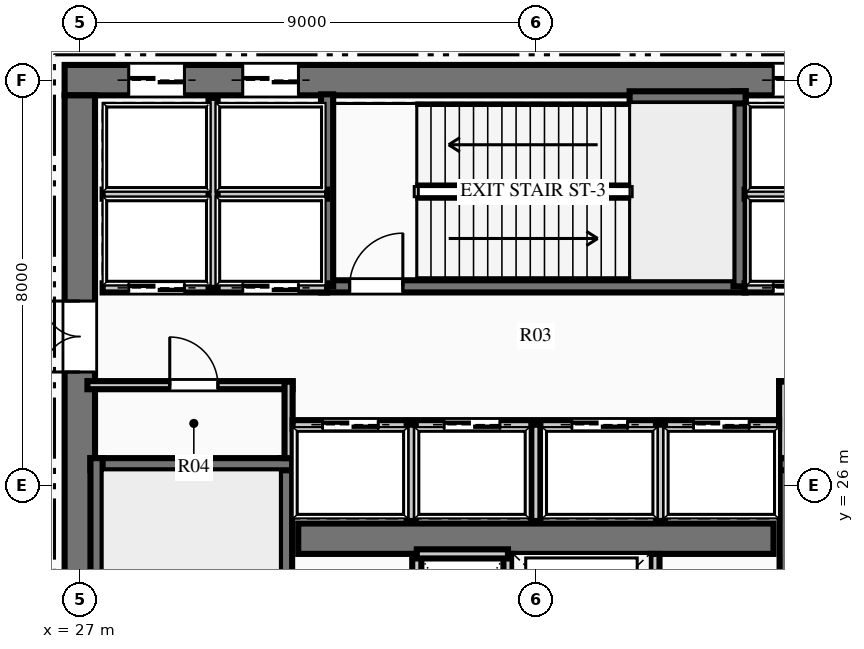
"""IFC4 building model, lengths in metres.
Left out: names, types, materials, properties, quantities, classifications, styles, units other than length and angle.
Written with IfcOpenShell. Run it as: python <this file> out.ifc"""

import sys

from ifc_helpers import new_model, si_unit, direction, frame, frame_2d, origin, place, context, subcontext, project, spatial, rectangle, extrude, element, fill, save


model = new_model("IFC4")
c1 = context("Model", 3, precision=1e-05, world=origin(), true_north=direction((0.0, 1.0)))
c2 = subcontext(c1, "Body", "Model", "MODEL_VIEW")
j1 = project(units=[si_unit("LENGTHUNIT", "METRE"), si_unit("PLANEANGLEUNIT", "RADIAN")], contexts=[c1])
p1 = place(None, origin())
s1 = spatial("IfcSite", under=j1, at=p1, CompositionType="ELEMENT")
p2 = place(p1, origin())
s2 = spatial("IfcBuilding", under=s1, at=p2, CompositionType="ELEMENT")
p3 = place(p2, frame((0.0, 0.0, 16.8)))
s3 = spatial("IfcBuildingStorey", under=s2, at=p3, CompositionType="ELEMENT", Elevation=16.8)
p4 = place(p3, frame((26.7, 34.0, 0.0), z_axis=(0.0, 0.0, 1.0), x_axis=(1.0, 0.0, 0.0)))
e1 = element("IfcWall", 1, at=p4, inside=s3, PredefinedType="SHEAR", context=c2, shape_type="SweptSolid", body=[
    extrude(rectangle(XDim=18.6, YDim=0.6, at=frame_2d((9.3, 0.0))), origin(), (0.0, 0.0, 1.0), 5.4),
])
p5 = place(p4, frame((1.265, 0.0, 0.0)))
e2 = element("IfcOpeningElement", 2, at=p5, cuts=e1, PredefinedType="OPENING", context=c2, shape_type="SweptSolid", body=[
    extrude(rectangle(XDim=1.1, YDim=2.15, at=frame_2d((0.55, 1.075))), frame((0.0, 0.31, 0.0), z_axis=(0.0, -1.0, 0.0), x_axis=(1.0, 0.0, 0.0)), (0.0, 0.0, 1.0), 0.62),
])
p6 = place(p4, frame((3.515, 0.0, 0.0)))
e3 = element("IfcOpeningElement", 3, at=p6, cuts=e1, PredefinedType="OPENING", context=c2, shape_type="SweptSolid", body=[
    extrude(rectangle(XDim=1.1, YDim=2.15, at=frame_2d((0.55, 1.075))), frame((0.0, 0.31, 0.0), z_axis=(0.0, -1.0, 0.0), x_axis=(1.0, 0.0, 0.0)), (0.0, 0.0, 1.0), 0.62),
])
p7 = place(p4, frame((13.985, 0.0, 0.0)))
e4 = element("IfcOpeningElement", 4, at=p7, cuts=e1, PredefinedType="OPENING", context=c2, shape_type="SweptSolid", body=[
    extrude(rectangle(XDim=1.1, YDim=2.15, at=frame_2d((0.55, 1.075))), frame((0.0, 0.31, 0.0), z_axis=(0.0, -1.0, 0.0), x_axis=(1.0, 0.0, 0.0)), (0.0, 0.0, 1.0), 0.62),
])
p8 = place(p4, frame((16.235, 0.0, 0.0)))
e5 = element("IfcOpeningElement", 5, at=p8, cuts=e1, PredefinedType="OPENING", context=c2, shape_type="SweptSolid", body=[
    extrude(rectangle(XDim=1.1, YDim=2.15, at=frame_2d((0.55, 1.075))), frame((0.0, 0.31, 0.0), z_axis=(0.0, -1.0, 0.0), x_axis=(1.0, 0.0, 0.0)), (0.0, 0.0, 1.0), 0.62),
])
p9 = place(p3, frame((27.0, 18.3, 0.0), z_axis=(0.0, 0.0, 1.0), x_axis=(0.0, 1.0, 0.0)))
e6 = element("IfcWall", 6, at=p9, inside=s3, PredefinedType="SHEAR", context=c2, shape_type="SweptSolid", body=[
    extrude(rectangle(XDim=15.4, YDim=0.6, at=frame_2d((7.7, 0.0))), origin(), (0.0, 0.0, 1.0), 5.4),
])
p10 = place(p9, frame((9.94, 0.0, 0.0)))
e7 = element("IfcOpeningElement", 7, at=p10, cuts=e6, PredefinedType="OPENING", context=c2, shape_type="SweptSolid", body=[
    extrude(rectangle(XDim=1.4, YDim=2.2, at=frame_2d((0.7, 1.1))), frame((0.0, 0.31, 0.0), z_axis=(0.0, -1.0, 0.0), x_axis=(1.0, 0.0, 0.0)), (0.0, 0.0, 1.0), 0.62),
])
p11 = place(p3, frame((31.31, 24.95, 0.0), z_axis=(0.0, 0.0, 1.0), x_axis=(1.0, 0.0, 0.0)))
e8 = element("IfcWall", 8, at=p11, inside=s3, PredefinedType="SHEAR", context=c2, shape_type="SweptSolid", body=[
    extrude(rectangle(XDim=9.38, YDim=0.6, at=frame_2d((4.69, 0.0))), origin(), (0.0, 0.0, 1.0), 5.4),
])
p12 = place(p3, frame((31.07, 18.28, 0.0), z_axis=(0.0, 0.0, 1.0), x_axis=(0.0, 1.0, 0.0)))
e9 = element("IfcWall", 9, at=p12, inside=s3, PredefinedType="SHEAR", context=c2, shape_type="SweptSolid", body=[
    extrude(rectangle(XDim=8.26, YDim=0.24, at=frame_2d((4.13, 0.0))), origin(), (0.0, 0.0, 1.0), 5.4),
])
p13 = place(p12, frame((0.365, 0.0, 0.0)))
e10 = element("IfcOpeningElement", 10, at=p13, cuts=e9, PredefinedType="OPENING", context=c2, shape_type="SweptSolid", body=[
    extrude(rectangle(XDim=1.05, YDim=2.15, at=frame_2d((0.525, 1.075))), frame((0.0, 0.13, 0.0), z_axis=(0.0, -1.0, 0.0), x_axis=(1.0, 0.0, 0.0)), (0.0, 0.0, 1.0), 0.26),
])
p14 = place(p3, frame((27.21, 26.42, 0.0), z_axis=(0.0, 0.0, 1.0), x_axis=(1.0, 0.0, 0.0)))
e11 = element("IfcWall", 11, at=p14, inside=s3, PredefinedType="SHEAR", context=c2, shape_type="SweptSolid", body=[
    extrude(rectangle(XDim=3.98, YDim=0.24, at=frame_2d((1.99, 0.0))), origin(), (0.0, 0.0, 1.0), 5.4),
])
p15 = place(p3, frame((27.33, 18.28, 0.0), z_axis=(0.0, 0.0, 1.0), x_axis=(0.0, 1.0, 0.0)))
e12 = element("IfcWall", 12, at=p15, inside=s3, PredefinedType="SHEAR", context=c2, shape_type="SweptSolid", body=[
    extrude(rectangle(XDim=8.26, YDim=0.24, at=frame_2d((4.13, 0.0))), origin(), (0.0, 0.0, 1.0), 5.4),
])
p16 = place(p3, frame((40.93, 18.28, 0.0), z_axis=(0.0, 0.0, 1.0), x_axis=(0.0, 1.0, 0.0)))
e13 = element("IfcWall", 13, at=p16, inside=s3, PredefinedType="SHEAR", context=c2, shape_type="SweptSolid", body=[
    extrude(rectangle(XDim=8.26, YDim=0.24, at=frame_2d((4.13, 0.0))), origin(), (0.0, 0.0, 1.0), 5.4),
])
p17 = place(p16, frame((0.365, 0.0, 0.0)))
e14 = element("IfcOpeningElement", 14, at=p17, cuts=e13, PredefinedType="OPENING", context=c2, shape_type="SweptSolid", body=[
    extrude(rectangle(XDim=1.05, YDim=2.15, at=frame_2d((0.525, 1.075))), frame((0.0, 0.13, 0.0), z_axis=(0.0, -1.0, 0.0), x_axis=(1.0, 0.0, 0.0)), (0.0, 0.0, 1.0), 0.26),
])
p18 = place(p3, frame((40.81, 26.42, 0.0), z_axis=(0.0, 0.0, 1.0), x_axis=(1.0, 0.0, 0.0)))
e15 = element("IfcWall", 15, at=p18, inside=s3, PredefinedType="SHEAR", context=c2, shape_type="SweptSolid", body=[
    extrude(rectangle(XDim=3.98, YDim=0.24, at=frame_2d((1.99, 0.0))), origin(), (0.0, 0.0, 1.0), 5.4),
])
p19 = place(p3, frame((31.76, 29.93, 0.0), z_axis=(0.0, 0.0, 1.0), x_axis=(1.0, 0.0, 0.0)))
e16 = element("IfcWall", 16, at=p19, inside=s3, PredefinedType="SHEAR", context=c2, shape_type="SweptSolid", body=[
    extrude(rectangle(XDim=8.38, YDim=0.24, at=frame_2d((4.19, 0.0))), origin(), (0.0, 0.0, 1.0), 5.4),
])
p20 = place(p19, frame((0.565, 0.0, 0.0)))
e17 = element("IfcOpeningElement", 17, at=p20, cuts=e16, PredefinedType="OPENING", context=c2, shape_type="SweptSolid", body=[
    extrude(rectangle(XDim=1.05, YDim=2.15, at=frame_2d((0.525, 1.075))), frame((0.0, 0.13, 0.0), z_axis=(0.0, -1.0, 0.0), x_axis=(1.0, 0.0, 0.0)), (0.0, 0.0, 1.0), 0.26),
])
p21 = place(p3, frame((31.88, 29.93, 0.0), z_axis=(0.0, 0.0, 1.0), x_axis=(0.0, 1.0, 0.0)))
e18 = element("IfcWall", 18, at=p21, inside=s3, PredefinedType="SHEAR", context=c2, shape_type="SweptSolid", body=[
    extrude(rectangle(XDim=3.79, YDim=0.24, at=frame_2d((1.895, 0.0))), origin(), (0.0, 0.0, 1.0), 5.4),
])
p22 = place(p3, frame((40.02, 29.93, 0.0), z_axis=(0.0, 0.0, 1.0), x_axis=(0.0, 1.0, 0.0)))
e19 = element("IfcWall", 19, at=p22, inside=s3, PredefinedType="SHEAR", context=c2, shape_type="SweptSolid", body=[
    extrude(rectangle(XDim=3.85, YDim=0.24, at=frame_2d((1.925, 0.0))), origin(), (0.0, 0.0, 1.0), 5.4),
])
p23 = place(p3, frame((37.85, 33.66, 0.0), z_axis=(0.0, 0.0, 1.0), x_axis=(1.0, 0.0, 0.0)))
e20 = element("IfcWall", 20, at=p23, inside=s3, PredefinedType="SHEAR", context=c2, shape_type="SweptSolid", body=[
    extrude(rectangle(XDim=2.29, YDim=0.24, at=frame_2d((1.145, 0.0))), origin(), (0.0, 0.0, 1.0), 5.4),
])
for number, where, z_axis, x_axis in (
    (21, (33.65, 22.05, 0.0), (0.0, 0.0, 1.0), (0.0, 1.0, 0.0)),
    (22, (35.45, 22.05, 0.0), (0.0, 0.0, 1.0), (0.0, 1.0, 0.0)),
):
    element("IfcWall", number, at=place(p3, frame(where, z_axis=z_axis, x_axis=x_axis)), inside=s3, PredefinedType="PARTITIONING", context=c2, shape_type="SweptSolid", body=[
        extrude(rectangle(XDim=2.6, YDim=0.18, at=frame_2d((1.3, 0.0))), origin(), (0.0, 0.0, 1.0), 4.98),
    ])
p24 = place(p3, frame((33.65, 24.65, 0.0), z_axis=(0.0, 0.0, 1.0), x_axis=(1.0, 0.0, 0.0)))
e23 = element("IfcWall", 23, at=p24, inside=s3, PredefinedType="PARTITIONING", context=c2, shape_type="SweptSolid", body=[
    extrude(rectangle(XDim=1.8, YDim=0.18, at=frame_2d((0.9, 0.0))), origin(), (0.0, 0.0, 1.0), 4.98),
])
p25 = place(p3, frame((38.35, 22.05, 0.0), z_axis=(0.0, 0.0, 1.0), x_axis=(0.0, 1.0, 0.0)))
e24 = element("IfcWall", 24, at=p25, inside=s3, PredefinedType="PARTITIONING", context=c2, shape_type="SweptSolid", body=[
    extrude(rectangle(XDim=2.6, YDim=0.18, at=frame_2d((1.3, 0.0))), origin(), (0.0, 0.0, 1.0), 4.98),
])
p26 = place(p3, frame((27.15, 27.98, 0.0), z_axis=(0.0, 0.0, 1.0), x_axis=(1.0, 0.0, 0.0)))
e25 = element("IfcWall", 25, at=p26, inside=s3, PredefinedType="PARTITIONING", context=c2, shape_type="SweptSolid", body=[
    extrude(rectangle(XDim=4.05, YDim=0.16, at=frame_2d((2.025, 0.0))), origin(), (0.0, 0.0, 1.0), 4.98),
])
p27 = place(p26, frame((1.625, 0.0, 0.0)))
e26 = element("IfcOpeningElement", 26, at=p27, cuts=e25, PredefinedType="OPENING", context=c2, shape_type="SweptSolid", body=[
    extrude(rectangle(XDim=0.95, YDim=2.15, at=frame_2d((0.475, 1.075))), frame((0.0, 0.09, 0.0), z_axis=(0.0, -1.0, 0.0), x_axis=(1.0, 0.0, 0.0)), (0.0, 0.0, 1.0), 0.18),
])
p28 = place(p3, frame((31.12, 26.54, 0.0), z_axis=(0.0, 0.0, 1.0), x_axis=(0.0, 1.0, 0.0)))
e27 = element("IfcWall", 27, at=p28, inside=s3, PredefinedType="PARTITIONING", context=c2, shape_type="SweptSolid", body=[
    extrude(rectangle(XDim=1.51, YDim=0.16, at=frame_2d((0.755, 0.0))), origin(), (0.0, 0.0, 1.0), 4.98),
])
p29 = place(p3, frame((40.8, 27.98, 0.0), z_axis=(0.0, 0.0, 1.0), x_axis=(1.0, 0.0, 0.0)))
e28 = element("IfcWall", 28, at=p29, inside=s3, PredefinedType="PARTITIONING", context=c2, shape_type="SweptSolid", body=[
    extrude(rectangle(XDim=4.05, YDim=0.16, at=frame_2d((2.025, 0.0))), origin(), (0.0, 0.0, 1.0), 4.98),
])
p30 = place(p29, frame((0.407, 0.0, 0.0)))
e29 = element("IfcOpeningElement", 29, at=p30, cuts=e28, PredefinedType="OPENING", context=c2, shape_type="SweptSolid", body=[
    extrude(rectangle(XDim=0.9, YDim=2.15, at=frame_2d((0.45, 1.075))), frame((0.0, 0.09, 0.0), z_axis=(0.0, -1.0, 0.0), x_axis=(1.0, 0.0, 0.0)), (0.0, 0.0, 1.0), 0.18),
])
p31 = place(p29, frame((2.2, 0.0, 0.0)))
e30 = element("IfcOpeningElement", 30, at=p31, cuts=e28, PredefinedType="OPENING", context=c2, shape_type="SweptSolid", body=[
    extrude(rectangle(XDim=0.9, YDim=2.15, at=frame_2d((0.45, 1.075))), frame((0.0, 0.09, 0.0), z_axis=(0.0, -1.0, 0.0), x_axis=(1.0, 0.0, 0.0)), (0.0, 0.0, 1.0), 0.18),
])
p32 = place(p3, frame((40.88, 26.54, 0.0), z_axis=(0.0, 0.0, 1.0), x_axis=(0.0, 1.0, 0.0)))
e31 = element("IfcWall", 31, at=p32, inside=s3, PredefinedType="PARTITIONING", context=c2, shape_type="SweptSolid", body=[
    extrude(rectangle(XDim=1.51, YDim=0.16, at=frame_2d((0.755, 0.0))), origin(), (0.0, 0.0, 1.0), 4.98),
])
p33 = place(p3, frame((27.45, 29.9, 0.0), z_axis=(0.0, 0.0, 1.0), x_axis=(1.0, 0.0, 0.0)))
e32 = element("IfcWall", 32, at=p33, inside=s3, PredefinedType="PARTITIONING", context=c2, shape_type="SweptSolid", body=[
    extrude(rectangle(XDim=4.43, YDim=0.18, at=frame_2d((2.215, 0.0))), origin(), (0.0, 0.0, 1.0), 4.98),
])
p34 = place(p33, frame((0.515, 0.0, 0.0)))
e33 = element("IfcOpeningElement", 33, at=p34, cuts=e32, PredefinedType="OPENING", context=c2, shape_type="SweptSolid", body=[
    extrude(rectangle(XDim=1.1, YDim=2.15, at=frame_2d((0.55, 1.075))), frame((0.0, 0.1, 0.0), z_axis=(0.0, -1.0, 0.0), x_axis=(1.0, 0.0, 0.0)), (0.0, 0.0, 1.0), 0.2),
])
p35 = place(p33, frame((2.765, 0.0, 0.0)))
e34 = element("IfcOpeningElement", 34, at=p35, cuts=e32, PredefinedType="OPENING", context=c2, shape_type="SweptSolid", body=[
    extrude(rectangle(XDim=1.1, YDim=2.15, at=frame_2d((0.55, 1.075))), frame((0.0, 0.1, 0.0), z_axis=(0.0, -1.0, 0.0), x_axis=(1.0, 0.0, 0.0)), (0.0, 0.0, 1.0), 0.2),
])
p36 = place(p3, frame((27.45, 31.75, 0.0), z_axis=(0.0, 0.0, 1.0), x_axis=(1.0, 0.0, 0.0)))
e35 = element("IfcWall", 35, at=p36, inside=s3, PredefinedType="PARTITIONING", context=c2, shape_type="SweptSolid", body=[
    extrude(rectangle(XDim=4.43, YDim=0.18, at=frame_2d((2.215, 0.0))), origin(), (0.0, 0.0, 1.0), 4.98),
])
p37 = place(p3, frame((29.63, 29.9, 0.0), z_axis=(0.0, 0.0, 1.0), x_axis=(0.0, 1.0, 0.0)))
e36 = element("IfcWall", 36, at=p37, inside=s3, PredefinedType="PARTITIONING", context=c2, shape_type="SweptSolid", body=[
    extrude(rectangle(XDim=3.75, YDim=0.18, at=frame_2d((1.875, 0.0))), origin(), (0.0, 0.0, 1.0), 4.98),
])
p38 = place(p3, frame((40.12, 29.9, 0.0), z_axis=(0.0, 0.0, 1.0), x_axis=(1.0, 0.0, 0.0)))
e37 = element("IfcWall", 37, at=p38, inside=s3, PredefinedType="PARTITIONING", context=c2, shape_type="SweptSolid", body=[
    extrude(rectangle(XDim=4.43, YDim=0.18, at=frame_2d((2.215, 0.0))), origin(), (0.0, 0.0, 1.0), 4.98),
])
p39 = place(p38, frame((0.565, 0.0, 0.0)))
e38 = element("IfcOpeningElement", 38, at=p39, cuts=e37, PredefinedType="OPENING", context=c2, shape_type="SweptSolid", body=[
    extrude(rectangle(XDim=1.1, YDim=2.15, at=frame_2d((0.55, 1.075))), frame((0.0, 0.1, 0.0), z_axis=(0.0, -1.0, 0.0), x_axis=(1.0, 0.0, 0.0)), (0.0, 0.0, 1.0), 0.2),
])
p40 = place(p38, frame((2.815, 0.0, 0.0)))
e39 = element("IfcOpeningElement", 39, at=p40, cuts=e37, PredefinedType="OPENING", context=c2, shape_type="SweptSolid", body=[
    extrude(rectangle(XDim=1.1, YDim=2.15, at=frame_2d((0.55, 1.075))), frame((0.0, 0.1, 0.0), z_axis=(0.0, -1.0, 0.0), x_axis=(1.0, 0.0, 0.0)), (0.0, 0.0, 1.0), 0.2),
])
p41 = place(p3, frame((40.12, 31.75, 0.0), z_axis=(0.0, 0.0, 1.0), x_axis=(1.0, 0.0, 0.0)))
e40 = element("IfcWall", 40, at=p41, inside=s3, PredefinedType="PARTITIONING", context=c2, shape_type="SweptSolid", body=[
    extrude(rectangle(XDim=4.43, YDim=0.18, at=frame_2d((2.215, 0.0))), origin(), (0.0, 0.0, 1.0), 4.98),
])
p42 = place(p3, frame((31.2, 27.2, 0.0), z_axis=(0.0, 0.0, 1.0), x_axis=(1.0, 0.0, 0.0)))
e41 = element("IfcWall", 41, at=p42, inside=s3, PredefinedType="PARTITIONING", context=c2, shape_type="SweptSolid", body=[
    extrude(rectangle(XDim=9.6, YDim=0.18, at=frame_2d((4.8, 0.0))), origin(), (0.0, 0.0, 1.0), 4.98),
])
p43 = place(p42, frame((0.59, 0.0, 0.0)))
e42 = element("IfcOpeningElement", 42, at=p43, cuts=e41, PredefinedType="OPENING", context=c2, shape_type="SweptSolid", body=[
    extrude(rectangle(XDim=1.1, YDim=2.15, at=frame_2d((0.55, 1.075))), frame((0.0, 0.1, 0.0), z_axis=(0.0, -1.0, 0.0), x_axis=(1.0, 0.0, 0.0)), (0.0, 0.0, 1.0), 0.2),
])
p44 = place(p42, frame((2.99, 0.0, 0.0)))
e43 = element("IfcOpeningElement", 43, at=p44, cuts=e41, PredefinedType="OPENING", context=c2, shape_type="SweptSolid", body=[
    extrude(rectangle(XDim=1.1, YDim=2.15, at=frame_2d((0.55, 1.075))), frame((0.0, 0.1, 0.0), z_axis=(0.0, -1.0, 0.0), x_axis=(1.0, 0.0, 0.0)), (0.0, 0.0, 1.0), 0.2),
])
p45 = place(p42, frame((5.51, 0.0, 0.0)))
e44 = element("IfcOpeningElement", 44, at=p45, cuts=e41, PredefinedType="OPENING", context=c2, shape_type="SweptSolid", body=[
    extrude(rectangle(XDim=1.1, YDim=2.15, at=frame_2d((0.55, 1.075))), frame((0.0, 0.1, 0.0), z_axis=(0.0, -1.0, 0.0), x_axis=(1.0, 0.0, 0.0)), (0.0, 0.0, 1.0), 0.2),
])
p46 = place(p42, frame((7.91, 0.0, 0.0)))
e45 = element("IfcOpeningElement", 45, at=p46, cuts=e41, PredefinedType="OPENING", context=c2, shape_type="SweptSolid", body=[
    extrude(rectangle(XDim=1.1, YDim=2.15, at=frame_2d((0.55, 1.075))), frame((0.0, 0.1, 0.0), z_axis=(0.0, -1.0, 0.0), x_axis=(1.0, 0.0, 0.0)), (0.0, 0.0, 1.0), 0.2),
])
for number, where, z_axis, x_axis in (
    (46, (33.54, 25.3, 0.0), (0.0, 0.0, 1.0), (0.0, 1.0, 0.0)),
    (47, (36.0, 25.3, 0.0), (0.0, 0.0, 1.0), (0.0, 1.0, 0.0)),
    (48, (38.46, 25.3, 0.0), (0.0, 0.0, 1.0), (0.0, 1.0, 0.0)),
):
    element("IfcWall", number, at=place(p3, frame(where, z_axis=z_axis, x_axis=x_axis)), inside=s3, PredefinedType="PARTITIONING", context=c2, shape_type="SweptSolid", body=[
        extrude(rectangle(XDim=1.9, YDim=0.18, at=frame_2d((0.95, 0.0))), origin(), (0.0, 0.0, 1.0), 4.98),
    ])
p47 = place(p27, origin())
e49 = element("IfcDoor", 49, at=p47, inside=s3, OperationType="SINGLE_SWING_LEFT", PredefinedType="DOOR", context=c2, shape_type="SweptSolid", body=[
    extrude(rectangle(XDim=0.95, YDim=2.15, at=frame_2d((0.475, 1.075))), frame((0.0, 0.025, 0.0), z_axis=(0.0, -1.0, 0.0), x_axis=(1.0, 0.0, 0.0)), (0.0, 0.0, 1.0), 0.05),
])
fill(e26, e49)
p48 = place(p20, origin())
e50 = element("IfcDoor", 50, at=p48, inside=s3, OperationType="SINGLE_SWING_RIGHT", PredefinedType="DOOR", context=c2, shape_type="SweptSolid", body=[
    extrude(rectangle(XDim=1.05, YDim=2.15, at=frame_2d((0.525, 1.075))), frame((0.0, 0.025, 0.0), z_axis=(0.0, -1.0, 0.0), x_axis=(1.0, 0.0, 0.0)), (0.0, 0.0, 1.0), 0.05),
])
fill(e17, e50)
p49 = place(p10, origin())
e51 = element("IfcDoor", 51, at=p49, inside=s3, OperationType="DOUBLE_DOOR_SINGLE_SWING", PredefinedType="DOOR", context=c2, shape_type="SweptSolid", body=[
    extrude(rectangle(XDim=1.4, YDim=2.2, at=frame_2d((0.7, 1.1))), frame((0.0, 0.025, 0.0), z_axis=(0.0, -1.0, 0.0), x_axis=(1.0, 0.0, 0.0)), (0.0, 0.0, 1.0), 0.05),
])
fill(e7, e51)
p50 = place(p34, origin())
e52 = element("IfcDoor", 52, at=p50, inside=s3, OperationType="SLIDING_TO_LEFT", PredefinedType="DOOR", context=c2, shape_type="SweptSolid", body=[
    extrude(rectangle(XDim=1.1, YDim=2.15, at=frame_2d((0.55, 1.075))), frame((0.0, 0.025, 0.0), z_axis=(0.0, -1.0, 0.0), x_axis=(1.0, 0.0, 0.0)), (0.0, 0.0, 1.0), 0.05),
])
fill(e33, e52)
p51 = place(p35, origin())
e53 = element("IfcDoor", 53, at=p51, inside=s3, OperationType="SLIDING_TO_LEFT", PredefinedType="DOOR", context=c2, shape_type="SweptSolid", body=[
    extrude(rectangle(XDim=1.1, YDim=2.15, at=frame_2d((0.55, 1.075))), frame((0.0, 0.025, 0.0), z_axis=(0.0, -1.0, 0.0), x_axis=(1.0, 0.0, 0.0)), (0.0, 0.0, 1.0), 0.05),
])
fill(e34, e53)
p52 = place(p5, origin())
e54 = element("IfcDoor", 54, at=p52, inside=s3, OperationType="SLIDING_TO_LEFT", PredefinedType="DOOR", context=c2, shape_type="SweptSolid", body=[
    extrude(rectangle(XDim=1.1, YDim=2.15, at=frame_2d((0.55, 1.075))), frame((0.0, 0.025, 0.0), z_axis=(0.0, -1.0, 0.0), x_axis=(1.0, 0.0, 0.0)), (0.0, 0.0, 1.0), 0.05),
])
fill(e2, e54)
p53 = place(p6, origin())
e55 = element("IfcDoor", 55, at=p53, inside=s3, OperationType="SLIDING_TO_LEFT", PredefinedType="DOOR", context=c2, shape_type="SweptSolid", body=[
    extrude(rectangle(XDim=1.1, YDim=2.15, at=frame_2d((0.55, 1.075))), frame((0.0, 0.025, 0.0), z_axis=(0.0, -1.0, 0.0), x_axis=(1.0, 0.0, 0.0)), (0.0, 0.0, 1.0), 0.05),
])
fill(e3, e55)
p54 = place(p39, origin())
e56 = element("IfcDoor", 56, at=p54, inside=s3, OperationType="SLIDING_TO_LEFT", PredefinedType="DOOR", context=c2, shape_type="SweptSolid", body=[
    extrude(rectangle(XDim=1.1, YDim=2.15, at=frame_2d((0.55, 1.075))), frame((0.0, 0.025, 0.0), z_axis=(0.0, -1.0, 0.0), x_axis=(1.0, 0.0, 0.0)), (0.0, 0.0, 1.0), 0.05),
])
fill(e38, e56)
p55 = place(p7, origin())
e57 = element("IfcDoor", 57, at=p55, inside=s3, OperationType="SLIDING_TO_LEFT", PredefinedType="DOOR", context=c2, shape_type="SweptSolid", body=[
    extrude(rectangle(XDim=1.1, YDim=2.15, at=frame_2d((0.55, 1.075))), frame((0.0, 0.025, 0.0), z_axis=(0.0, -1.0, 0.0), x_axis=(1.0, 0.0, 0.0)), (0.0, 0.0, 1.0), 0.05),
])
fill(e4, e57)
p56 = place(p43, origin())
e58 = element("IfcDoor", 58, at=p56, inside=s3, OperationType="SLIDING_TO_LEFT", PredefinedType="DOOR", context=c2, shape_type="SweptSolid", body=[
    extrude(rectangle(XDim=1.1, YDim=2.15, at=frame_2d((0.55, 1.075))), frame((0.0, 0.025, 0.0), z_axis=(0.0, -1.0, 0.0), x_axis=(1.0, 0.0, 0.0)), (0.0, 0.0, 1.0), 0.05),
])
fill(e42, e58)
p57 = place(p44, origin())
e59 = element("IfcDoor", 59, at=p57, inside=s3, OperationType="SLIDING_TO_LEFT", PredefinedType="DOOR", context=c2, shape_type="SweptSolid", body=[
    extrude(rectangle(XDim=1.1, YDim=2.15, at=frame_2d((0.55, 1.075))), frame((0.0, 0.025, 0.0), z_axis=(0.0, -1.0, 0.0), x_axis=(1.0, 0.0, 0.0)), (0.0, 0.0, 1.0), 0.05),
])
fill(e43, e59)
p58 = place(p45, origin())
e60 = element("IfcDoor", 60, at=p58, inside=s3, OperationType="SLIDING_TO_LEFT", PredefinedType="DOOR", context=c2, shape_type="SweptSolid", body=[
    extrude(rectangle(XDim=1.1, YDim=2.15, at=frame_2d((0.55, 1.075))), frame((0.0, 0.025, 0.0), z_axis=(0.0, -1.0, 0.0), x_axis=(1.0, 0.0, 0.0)), (0.0, 0.0, 1.0), 0.05),
])
fill(e44, e60)
p59 = place(p46, origin())
e61 = element("IfcDoor", 61, at=p59, inside=s3, OperationType="SLIDING_TO_LEFT", PredefinedType="DOOR", context=c2, shape_type="SweptSolid", body=[
    extrude(rectangle(XDim=1.1, YDim=2.15, at=frame_2d((0.55, 1.075))), frame((0.0, 0.025, 0.0), z_axis=(0.0, -1.0, 0.0), x_axis=(1.0, 0.0, 0.0)), (0.0, 0.0, 1.0), 0.05),
])
fill(e45, e61)
save(model, sys.argv[1])
